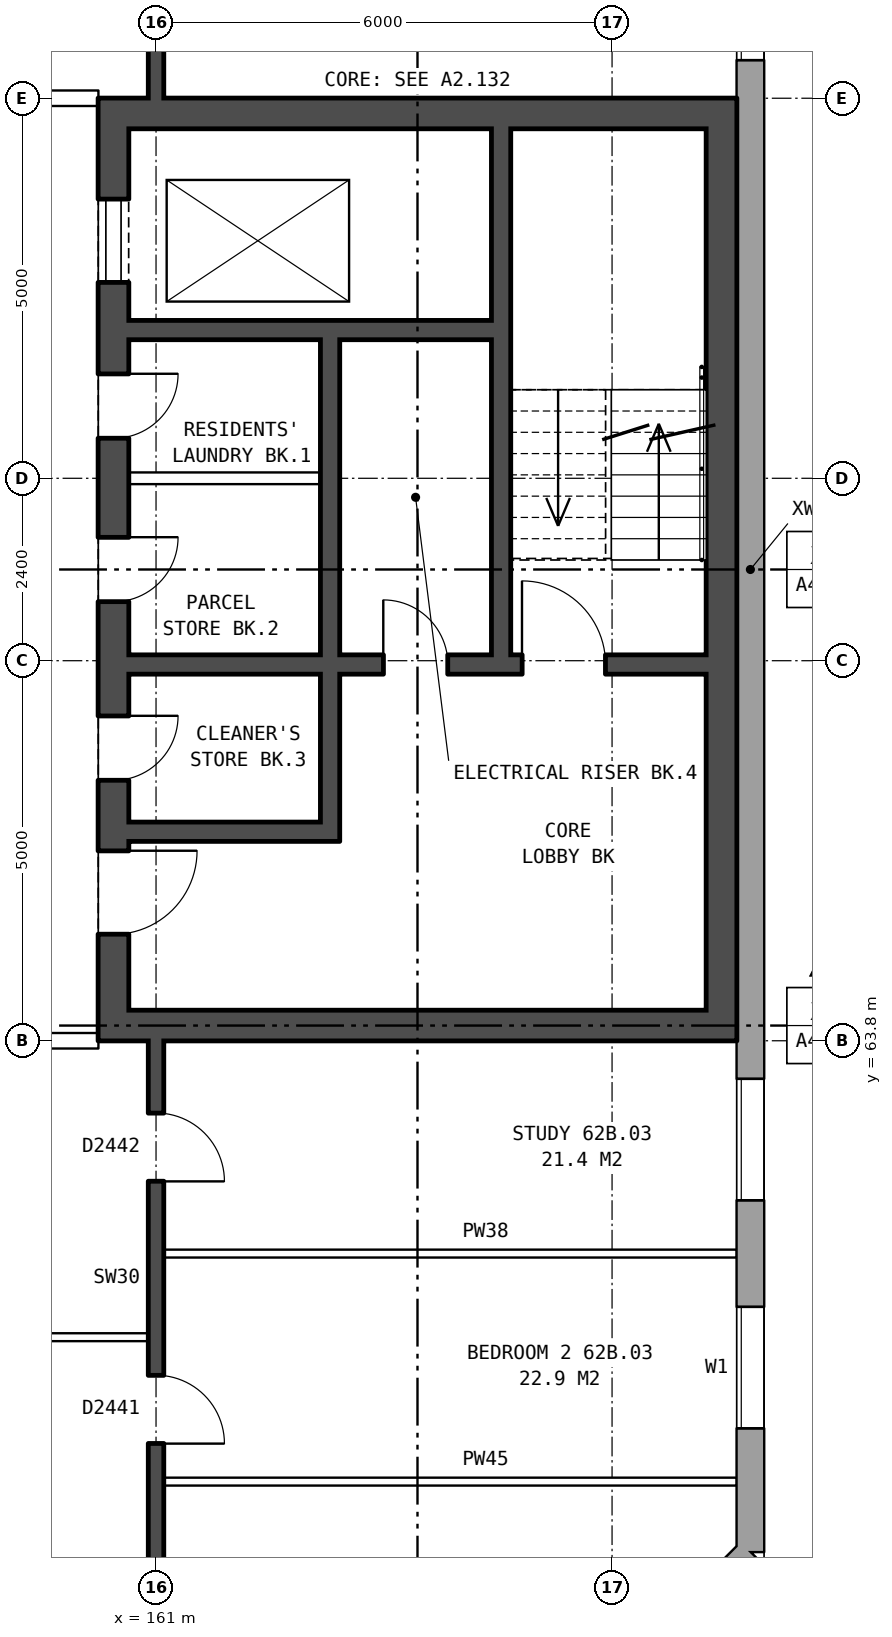
"""IFC4 building model, lengths in metres.
Left out: names, types, materials, properties, quantities, classifications, styles, units other than length and angle.
Written with IfcOpenShell. Run it as: python <this file> out.ifc"""

import sys

from ifc_helpers import new_model, si_unit, direction, frame, frame_2d, origin, place, context, subcontext, project, spatial, rectangle, extrude, element, fill, save


model = new_model("IFC4")
c1 = context("Model", 3, precision=1e-05, world=origin(), true_north=direction((0.0, 1.0)))
c2 = subcontext(c1, "Body", "Model", "MODEL_VIEW")
j1 = project(units=[si_unit("LENGTHUNIT", "METRE"), si_unit("PLANEANGLEUNIT", "RADIAN")], contexts=[c1])
p1 = place(None, origin())
s1 = spatial("IfcSite", under=j1, at=p1, CompositionType="ELEMENT")
p2 = place(p1, origin())
s2 = spatial("IfcBuilding", under=s1, at=p2, CompositionType="ELEMENT")
p3 = place(p2, frame((0.0, 0.0, 221.4)))
s3 = spatial("IfcBuildingStorey", under=s2, at=p3, CompositionType="ELEMENT", Elevation=221.4)
p4 = place(p3, frame((165.925, 54.18, 0.0), z_axis=(0.0, 0.0, 1.0), x_axis=(0.707106781187, 0.707106781187, 0.0)))
e1 = element("IfcWall", 1, at=p4, inside=s3, PredefinedType="STANDARD", context=c2, shape_type="SweptSolid", body=[
    extrude(rectangle(XDim=4.094, YDim=0.36, at=frame_2d((2.047, 0.0))), origin(), (0.0, 0.0, 1.0), 2.85),
])
p5 = place(p4, frame((1.247, 0.0, 0.8)))
e2 = element("IfcOpeningElement", 2, at=p5, cuts=e1, PredefinedType="OPENING", context=c2, shape_type="SweptSolid", body=[
    extrude(rectangle(XDim=1.6, YDim=1.8, at=frame_2d((0.8, 0.9))), frame((0.0, 0.19, 0.0), z_axis=(0.0, -1.0, 0.0), x_axis=(1.0, 0.0, 0.0)), (0.0, 0.0, 1.0), 0.38),
])
p6 = place(p3, frame((168.82, 57.075, 0.0), z_axis=(0.0, 0.0, 1.0), x_axis=(0.0, 1.0, 0.0)))
e3 = element("IfcWall", 3, at=p6, inside=s3, PredefinedType="STANDARD", context=c2, shape_type="SweptSolid", body=[
    extrude(rectangle(XDim=25.851, YDim=0.36, at=frame_2d((12.925, 0.0))), origin(), (0.0, 0.0, 1.0), 2.85),
])
p7 = place(p6, frame((1.625, 0.0, 0.8)))
e4 = element("IfcOpeningElement", 4, at=p7, cuts=e3, PredefinedType="OPENING", context=c2, shape_type="SweptSolid", body=[
    extrude(rectangle(XDim=1.6, YDim=1.8, at=frame_2d((0.8, 0.9))), frame((0.0, 0.19, 0.0), z_axis=(0.0, -1.0, 0.0), x_axis=(1.0, 0.0, 0.0)), (0.0, 0.0, 1.0), 0.38),
])
p8 = place(p6, frame((4.625, 0.0, 0.8)))
e5 = element("IfcOpeningElement", 5, at=p8, cuts=e3, PredefinedType="OPENING", context=c2, shape_type="SweptSolid", body=[
    extrude(rectangle(XDim=1.6, YDim=1.8, at=frame_2d((0.8, 0.9))), frame((0.0, 0.19, 0.0), z_axis=(0.0, -1.0, 0.0), x_axis=(1.0, 0.0, 0.0)), (0.0, 0.0, 1.0), 0.38),
])
p9 = place(p6, frame((19.625, 0.0, 0.8)))
e6 = element("IfcOpeningElement", 6, at=p9, cuts=e3, PredefinedType="OPENING", context=c2, shape_type="SweptSolid", body=[
    extrude(rectangle(XDim=1.6, YDim=1.8, at=frame_2d((0.8, 0.9))), frame((0.0, 0.19, 0.0), z_axis=(0.0, -1.0, 0.0), x_axis=(1.0, 0.0, 0.0)), (0.0, 0.0, 1.0), 0.38),
])
p10 = place(p6, frame((22.625, 0.0, 0.8)))
e7 = element("IfcOpeningElement", 7, at=p10, cuts=e3, PredefinedType="OPENING", context=c2, shape_type="SweptSolid", body=[
    extrude(rectangle(XDim=1.6, YDim=1.8, at=frame_2d((0.8, 0.9))), frame((0.0, 0.19, 0.0), z_axis=(0.0, -1.0, 0.0), x_axis=(1.0, 0.0, 0.0)), (0.0, 0.0, 1.0), 0.38),
])
p11 = place(p3, frame((160.44, 76.2, 0.0), z_axis=(0.0, 0.0, 1.0), x_axis=(0.0, -1.0, 0.0)))
e8 = element("IfcWall", 8, at=p11, inside=s3, PredefinedType="SHEAR", context=c2, shape_type="SweptSolid", body=[
    extrude(rectangle(XDim=12.4, YDim=0.4, at=frame_2d((6.2, 0.0))), origin(), (0.0, 0.0, 1.0), 2.85),
])
p12 = place(p11, frame((1.325, 0.0, 0.0)))
e9 = element("IfcOpeningElement", 9, at=p12, cuts=e8, PredefinedType="OPENING", context=c2, shape_type="SweptSolid", body=[
    extrude(rectangle(XDim=1.1, YDim=2.1, at=frame_2d((0.55, 1.05))), frame((0.0, 0.21, 0.0), z_axis=(0.0, -1.0, 0.0), x_axis=(1.0, 0.0, 0.0)), (0.0, 0.0, 1.0), 0.42),
])
p13 = place(p11, frame((3.625, 0.0, 0.0)))
e10 = element("IfcOpeningElement", 10, at=p13, cuts=e8, PredefinedType="OPENING", context=c2, shape_type="SweptSolid", body=[
    extrude(rectangle(XDim=0.85, YDim=2.1, at=frame_2d((0.425, 1.05))), frame((0.0, 0.21, 0.0), z_axis=(0.0, -1.0, 0.0), x_axis=(1.0, 0.0, 0.0)), (0.0, 0.0, 1.0), 0.42),
])
p14 = place(p11, frame((5.775, 0.0, 0.0)))
e11 = element("IfcOpeningElement", 11, at=p14, cuts=e8, PredefinedType="OPENING", context=c2, shape_type="SweptSolid", body=[
    extrude(rectangle(XDim=0.85, YDim=2.1, at=frame_2d((0.425, 1.05))), frame((0.0, 0.21, 0.0), z_axis=(0.0, -1.0, 0.0), x_axis=(1.0, 0.0, 0.0)), (0.0, 0.0, 1.0), 0.42),
])
p15 = place(p11, frame((9.9, 0.0, 0.0)))
e12 = element("IfcOpeningElement", 12, at=p15, cuts=e8, PredefinedType="OPENING", context=c2, shape_type="SweptSolid", body=[
    extrude(rectangle(XDim=1.1, YDim=2.1, at=frame_2d((0.55, 1.05))), frame((0.0, 0.21, 0.0), z_axis=(0.0, -1.0, 0.0), x_axis=(1.0, 0.0, 0.0)), (0.0, 0.0, 1.0), 0.42),
])
p16 = place(p11, frame((8.125, 0.0, 0.0)))
e13 = element("IfcOpeningElement", 13, at=p16, cuts=e8, PredefinedType="OPENING", context=c2, shape_type="SweptSolid", body=[
    extrude(rectangle(XDim=0.85, YDim=2.1, at=frame_2d((0.425, 1.05))), frame((0.0, 0.21, 0.0), z_axis=(0.0, -1.0, 0.0), x_axis=(1.0, 0.0, 0.0)), (0.0, 0.0, 1.0), 0.42),
])
p17 = place(p3, frame((168.44, 76.2, 0.0), z_axis=(0.0, 0.0, 1.0), x_axis=(0.0, -1.0, 0.0)))
e14 = element("IfcWall", 14, at=p17, inside=s3, PredefinedType="SHEAR", context=c2, shape_type="SweptSolid", body=[
    extrude(rectangle(XDim=12.4, YDim=0.4, at=frame_2d((6.2, 0.0))), origin(), (0.0, 0.0, 1.0), 2.85),
])
for number, where, z_axis, x_axis in (
    (15, (160.64, 76.0, 0.0), (0.0, 0.0, 1.0), (1.0, 0.0, 0.0)),
    (16, (160.64, 64.0, 0.0), (0.0, 0.0, 1.0), (1.0, 0.0, 0.0)),
):
    element("IfcWall", number, at=place(p3, frame(where, z_axis=z_axis, x_axis=x_axis)), inside=s3, PredefinedType="SHEAR", context=c2, shape_type="SweptSolid", body=[
        extrude(rectangle(XDim=7.6, YDim=0.4, at=frame_2d((3.8, 0.0))), origin(), (0.0, 0.0, 1.0), 2.85),
    ])
p18 = place(p3, frame((160.64, 73.15, 0.0), z_axis=(0.0, 0.0, 1.0), x_axis=(1.0, 0.0, 0.0)))
e17 = element("IfcWall", 17, at=p18, inside=s3, PredefinedType="SHEAR", context=c2, shape_type="SweptSolid", body=[
    extrude(rectangle(XDim=4.775, YDim=0.25, at=frame_2d((2.388, 0.0))), origin(), (0.0, 0.0, 1.0), 2.85),
])
p19 = place(p3, frame((160.64, 71.2, 0.0), z_axis=(0.0, 0.0, 1.0), x_axis=(1.0, 0.0, 0.0)))
e18 = element("IfcWall", 18, at=p19, inside=s3, PredefinedType="PARTITIONING", context=c2, shape_type="SweptSolid", body=[
    extrude(rectangle(XDim=2.525, YDim=0.15, at=frame_2d((1.263, 0.0))), origin(), (0.0, 0.0, 1.0), 2.85),
])
p20 = place(p3, frame((160.64, 68.75, 0.0), z_axis=(0.0, 0.0, 1.0), x_axis=(1.0, 0.0, 0.0)))
e19 = element("IfcWall", 19, at=p20, inside=s3, PredefinedType="SHEAR", context=c2, shape_type="SweptSolid", body=[
    extrude(rectangle(XDim=7.6, YDim=0.25, at=frame_2d((3.8, 0.0))), origin(), (0.0, 0.0, 1.0), 2.85),
])
p21 = place(p20, frame((5.175, 0.0, 0.0)))
e20 = element("IfcOpeningElement", 20, at=p21, cuts=e19, PredefinedType="OPENING", context=c2, shape_type="SweptSolid", body=[
    extrude(rectangle(XDim=1.1, YDim=2.1, at=frame_2d((0.55, 1.05))), frame((0.0, 0.135, 0.0), z_axis=(0.0, -1.0, 0.0), x_axis=(1.0, 0.0, 0.0)), (0.0, 0.0, 1.0), 0.27),
])
p22 = place(p20, frame((3.35, 0.0, 0.0)))
e21 = element("IfcOpeningElement", 21, at=p22, cuts=e19, PredefinedType="OPENING", context=c2, shape_type="SweptSolid", body=[
    extrude(rectangle(XDim=0.85, YDim=2.1, at=frame_2d((0.425, 1.05))), frame((0.0, 0.135, 0.0), z_axis=(0.0, -1.0, 0.0), x_axis=(1.0, 0.0, 0.0)), (0.0, 0.0, 1.0), 0.27),
])
p23 = place(p3, frame((160.64, 66.55, 0.0), z_axis=(0.0, 0.0, 1.0), x_axis=(1.0, 0.0, 0.0)))
e22 = element("IfcWall", 22, at=p23, inside=s3, PredefinedType="SHEAR", context=c2, shape_type="SweptSolid", body=[
    extrude(rectangle(XDim=2.525, YDim=0.25, at=frame_2d((1.263, 0.0))), origin(), (0.0, 0.0, 1.0), 2.85),
])
p24 = place(p3, frame((163.29, 73.025, 0.0), z_axis=(0.0, 0.0, 1.0), x_axis=(0.0, -1.0, 0.0)))
e23 = element("IfcWall", 23, at=p24, inside=s3, PredefinedType="SHEAR", context=c2, shape_type="SweptSolid", body=[
    extrude(rectangle(XDim=4.15, YDim=0.25, at=frame_2d((2.075, 0.0))), origin(), (0.0, 0.0, 1.0), 2.85),
])
p25 = place(p3, frame((163.29, 68.625, 0.0), z_axis=(0.0, 0.0, 1.0), x_axis=(0.0, -1.0, 0.0)))
e24 = element("IfcWall", 24, at=p25, inside=s3, PredefinedType="SHEAR", context=c2, shape_type="SweptSolid", body=[
    extrude(rectangle(XDim=2.2, YDim=0.25, at=frame_2d((1.1, 0.0))), origin(), (0.0, 0.0, 1.0), 2.85),
])
p26 = place(p3, frame((165.54, 75.8, 0.0), z_axis=(0.0, 0.0, 1.0), x_axis=(0.0, -1.0, 0.0)))
e25 = element("IfcWall", 25, at=p26, inside=s3, PredefinedType="SHEAR", context=c2, shape_type="SweptSolid", body=[
    extrude(rectangle(XDim=6.925, YDim=0.25, at=frame_2d((3.462, 0.0))), origin(), (0.0, 0.0, 1.0), 2.85),
])
p27 = place(p3, frame((161.1, 58.0, 0.0), z_axis=(0.0, 0.0, 1.0), x_axis=(1.0, 0.0, 0.0)))
e26 = element("IfcWall", 26, at=p27, inside=s3, PredefinedType="PARTITIONING", context=c2, shape_type="SweptSolid", body=[
    extrude(rectangle(XDim=7.54, YDim=0.1, at=frame_2d((3.77, 0.0))), origin(), (0.0, 0.0, 1.0), 2.85),
])
p28 = place(p3, frame((155.1, 59.9, 0.0), z_axis=(0.0, 0.0, 1.0), x_axis=(1.0, 0.0, 0.0)))
e27 = element("IfcWall", 27, at=p28, inside=s3, PredefinedType="PARTITIONING", context=c2, shape_type="SweptSolid", body=[
    extrude(rectangle(XDim=5.8, YDim=0.1, at=frame_2d((2.9, 0.0))), origin(), (0.0, 0.0, 1.0), 2.85),
])
p29 = place(p28, frame((3.6, 0.0, 0.0)))
e28 = element("IfcOpeningElement", 28, at=p29, cuts=e27, PredefinedType="OPENING", context=c2, shape_type="SweptSolid", body=[
    extrude(rectangle(XDim=0.9, YDim=2.1, at=frame_2d((0.45, 1.05))), frame((0.0, 0.06, 0.0), z_axis=(0.0, -1.0, 0.0), x_axis=(1.0, 0.0, 0.0)), (0.0, 0.0, 1.0), 0.12),
])
p30 = place(p28, frame((0.7, 0.0, 0.0)))
e29 = element("IfcOpeningElement", 29, at=p30, cuts=e27, PredefinedType="OPENING", context=c2, shape_type="SweptSolid", body=[
    extrude(rectangle(XDim=0.9, YDim=2.1, at=frame_2d((0.45, 1.05))), frame((0.0, 0.06, 0.0), z_axis=(0.0, -1.0, 0.0), x_axis=(1.0, 0.0, 0.0)), (0.0, 0.0, 1.0), 0.12),
])
p31 = place(p3, frame((161.1, 61.0, 0.0), z_axis=(0.0, 0.0, 1.0), x_axis=(1.0, 0.0, 0.0)))
e30 = element("IfcWall", 30, at=p31, inside=s3, PredefinedType="PARTITIONING", context=c2, shape_type="SweptSolid", body=[
    extrude(rectangle(XDim=7.54, YDim=0.1, at=frame_2d((3.77, 0.0))), origin(), (0.0, 0.0, 1.0), 2.85),
])
p32 = place(p3, frame((157.24, 63.8, 0.0), z_axis=(0.0, 0.0, 1.0), x_axis=(1.0, 0.0, 0.0)))
e31 = element("IfcWall", 31, at=p32, inside=s3, PredefinedType="PARTITIONING", context=c2, shape_type="SweptSolid", body=[
    extrude(rectangle(XDim=3.0, YDim=0.2, at=frame_2d((1.5, 0.0))), origin(), (0.0, 0.0, 1.0), 2.85),
])
p33 = place(p32, frame((1.0, 0.0, 0.0)))
e32 = element("IfcOpeningElement", 32, at=p33, cuts=e31, PredefinedType="OPENING", context=c2, shape_type="SweptSolid", body=[
    extrude(rectangle(XDim=1.0, YDim=2.1, at=frame_2d((0.5, 1.05))), frame((0.0, 0.11, 0.0), z_axis=(0.0, -1.0, 0.0), x_axis=(1.0, 0.0, 0.0)), (0.0, 0.0, 1.0), 0.22),
])
p34 = place(p3, frame((157.24, 76.2, 0.0), z_axis=(0.0, 0.0, 1.0), x_axis=(1.0, 0.0, 0.0)))
e33 = element("IfcWall", 33, at=p34, inside=s3, PredefinedType="PARTITIONING", context=c2, shape_type="SweptSolid", body=[
    extrude(rectangle(XDim=3.0, YDim=0.2, at=frame_2d((1.5, 0.0))), origin(), (0.0, 0.0, 1.0), 2.85),
])
p35 = place(p34, frame((1.0, 0.0, 0.0)))
e34 = element("IfcOpeningElement", 34, at=p35, cuts=e33, PredefinedType="OPENING", context=c2, shape_type="SweptSolid", body=[
    extrude(rectangle(XDim=1.0, YDim=2.1, at=frame_2d((0.5, 1.05))), frame((0.0, 0.11, 0.0), z_axis=(0.0, -1.0, 0.0), x_axis=(1.0, 0.0, 0.0)), (0.0, 0.0, 1.0), 0.22),
])
p36 = place(p3, frame((161.0, 54.36, 0.0), z_axis=(0.0, 0.0, 1.0), x_axis=(0.0, 1.0, 0.0)))
e35 = element("IfcWall", 35, at=p36, inside=s3, PredefinedType="SOLIDWALL", context=c2, shape_type="SweptSolid", body=[
    extrude(rectangle(XDim=9.44, YDim=0.2, at=frame_2d((4.72, 0.0))), origin(), (0.0, 0.0, 1.0), 2.85),
])
p37 = place(p36, frame((1.37, 0.0, 0.0)))
e36 = element("IfcOpeningElement", 36, at=p37, cuts=e35, PredefinedType="OPENING", context=c2, shape_type="SweptSolid", body=[
    extrude(rectangle(XDim=0.9, YDim=2.1, at=frame_2d((0.45, 1.05))), frame((0.0, 0.11, 0.0), z_axis=(0.0, -1.0, 0.0), x_axis=(1.0, 0.0, 0.0)), (0.0, 0.0, 1.0), 0.22),
])
p38 = place(p36, frame((4.14, 0.0, 0.0)))
e37 = element("IfcOpeningElement", 37, at=p38, cuts=e35, PredefinedType="OPENING", context=c2, shape_type="SweptSolid", body=[
    extrude(rectangle(XDim=0.9, YDim=2.1, at=frame_2d((0.45, 1.05))), frame((0.0, 0.11, 0.0), z_axis=(0.0, -1.0, 0.0), x_axis=(1.0, 0.0, 0.0)), (0.0, 0.0, 1.0), 0.22),
])
p39 = place(p36, frame((7.59, 0.0, 0.0)))
e38 = element("IfcOpeningElement", 38, at=p39, cuts=e35, PredefinedType="OPENING", context=c2, shape_type="SweptSolid", body=[
    extrude(rectangle(XDim=0.9, YDim=2.1, at=frame_2d((0.45, 1.05))), frame((0.0, 0.11, 0.0), z_axis=(0.0, -1.0, 0.0), x_axis=(1.0, 0.0, 0.0)), (0.0, 0.0, 1.0), 0.22),
])
p40 = place(p3, frame((161.0, 76.2, 0.0), z_axis=(0.0, 0.0, 1.0), x_axis=(0.0, 1.0, 0.0)))
e39 = element("IfcWall", 39, at=p40, inside=s3, PredefinedType="SOLIDWALL", context=c2, shape_type="SweptSolid", body=[
    extrude(rectangle(XDim=9.44, YDim=0.2, at=frame_2d((4.72, 0.0))), origin(), (0.0, 0.0, 1.0), 2.85),
])
p41 = place(p40, frame((7.17, 0.0, 0.0)))
e40 = element("IfcOpeningElement", 40, at=p41, cuts=e39, PredefinedType="OPENING", context=c2, shape_type="SweptSolid", body=[
    extrude(rectangle(XDim=0.9, YDim=2.1, at=frame_2d((0.45, 1.05))), frame((0.0, 0.11, 0.0), z_axis=(0.0, -1.0, 0.0), x_axis=(1.0, 0.0, 0.0)), (0.0, 0.0, 1.0), 0.22),
])
p42 = place(p40, frame((4.1, 0.0, 0.0)))
e41 = element("IfcOpeningElement", 41, at=p42, cuts=e39, PredefinedType="OPENING", context=c2, shape_type="SweptSolid", body=[
    extrude(rectangle(XDim=0.9, YDim=2.1, at=frame_2d((0.45, 1.05))), frame((0.0, 0.11, 0.0), z_axis=(0.0, -1.0, 0.0), x_axis=(1.0, 0.0, 0.0)), (0.0, 0.0, 1.0), 0.22),
])
p43 = place(p40, frame((0.95, 0.0, 0.0)))
e42 = element("IfcOpeningElement", 42, at=p43, cuts=e39, PredefinedType="OPENING", context=c2, shape_type="SweptSolid", body=[
    extrude(rectangle(XDim=0.9, YDim=2.1, at=frame_2d((0.45, 1.05))), frame((0.0, 0.11, 0.0), z_axis=(0.0, -1.0, 0.0), x_axis=(1.0, 0.0, 0.0)), (0.0, 0.0, 1.0), 0.22),
])
p44 = place(p7, origin())
e43 = element("IfcWindow", 43, at=p44, inside=s3, PartitioningType="SINGLE_PANEL", PredefinedType="WINDOW", context=c2, shape_type="SweptSolid", body=[
    extrude(rectangle(XDim=1.6, YDim=1.8, at=frame_2d((0.8, 0.9))), frame((0.0, 0.15, 0.0), z_axis=(0.0, -1.0, 0.0), x_axis=(1.0, 0.0, 0.0)), (0.0, 0.0, 1.0), 0.06),
])
fill(e4, e43)
p45 = place(p8, origin())
e44 = element("IfcWindow", 44, at=p45, inside=s3, PartitioningType="SINGLE_PANEL", PredefinedType="WINDOW", context=c2, shape_type="SweptSolid", body=[
    extrude(rectangle(XDim=1.6, YDim=1.8, at=frame_2d((0.8, 0.9))), frame((0.0, 0.15, 0.0), z_axis=(0.0, -1.0, 0.0), x_axis=(1.0, 0.0, 0.0)), (0.0, 0.0, 1.0), 0.06),
])
fill(e5, e44)
p46 = place(p9, origin())
e45 = element("IfcWindow", 45, at=p46, inside=s3, PartitioningType="SINGLE_PANEL", PredefinedType="WINDOW", context=c2, shape_type="SweptSolid", body=[
    extrude(rectangle(XDim=1.6, YDim=1.8, at=frame_2d((0.8, 0.9))), frame((0.0, 0.15, 0.0), z_axis=(0.0, -1.0, 0.0), x_axis=(1.0, 0.0, 0.0)), (0.0, 0.0, 1.0), 0.06),
])
fill(e6, e45)
p47 = place(p12, origin())
e46 = element("IfcDoor", 46, at=p47, inside=s3, OperationType="DOUBLE_DOOR_SLIDING", PredefinedType="DOOR", context=c2, shape_type="SweptSolid", body=[
    extrude(rectangle(XDim=1.1, YDim=2.1, at=frame_2d((0.55, 1.05))), frame((0.0, 0.185, 0.0), z_axis=(0.0, -1.0, 0.0), x_axis=(1.0, 0.0, 0.0)), (0.0, 0.0, 1.0), 0.05),
])
fill(e9, e46)
p48 = place(p13, origin())
e47 = element("IfcDoor", 47, at=p48, inside=s3, OperationType="SINGLE_SWING_LEFT", PredefinedType="DOOR", context=c2, shape_type="SweptSolid", body=[
    extrude(rectangle(XDim=0.85, YDim=2.1, at=frame_2d((0.425, 1.05))), frame((0.0, 0.185, 0.0), z_axis=(0.0, -1.0, 0.0), x_axis=(1.0, 0.0, 0.0)), (0.0, 0.0, 1.0), 0.05),
])
fill(e10, e47)
p49 = place(p14, origin())
e48 = element("IfcDoor", 48, at=p49, inside=s3, OperationType="SINGLE_SWING_LEFT", PredefinedType="DOOR", context=c2, shape_type="SweptSolid", body=[
    extrude(rectangle(XDim=0.85, YDim=2.1, at=frame_2d((0.425, 1.05))), frame((0.0, 0.185, 0.0), z_axis=(0.0, -1.0, 0.0), x_axis=(1.0, 0.0, 0.0)), (0.0, 0.0, 1.0), 0.05),
])
fill(e11, e48)
p50 = place(p15, origin())
e49 = element("IfcDoor", 49, at=p50, inside=s3, OperationType="SINGLE_SWING_LEFT", PredefinedType="DOOR", context=c2, shape_type="SweptSolid", body=[
    extrude(rectangle(XDim=1.1, YDim=2.1, at=frame_2d((0.55, 1.05))), frame((0.0, 0.185, 0.0), z_axis=(0.0, -1.0, 0.0), x_axis=(1.0, 0.0, 0.0)), (0.0, 0.0, 1.0), 0.05),
])
fill(e12, e49)
p51 = place(p21, origin())
e50 = element("IfcDoor", 50, at=p51, inside=s3, OperationType="SINGLE_SWING_LEFT", PredefinedType="DOOR", context=c2, shape_type="SweptSolid", body=[
    extrude(rectangle(XDim=1.1, YDim=2.1, at=frame_2d((0.55, 1.05))), frame((0.0, 0.025, 0.0), z_axis=(0.0, -1.0, 0.0), x_axis=(1.0, 0.0, 0.0)), (0.0, 0.0, 1.0), 0.05),
])
fill(e20, e50)
p52 = place(p16, origin())
e51 = element("IfcDoor", 51, at=p52, inside=s3, OperationType="SINGLE_SWING_LEFT", PredefinedType="DOOR", context=c2, shape_type="SweptSolid", body=[
    extrude(rectangle(XDim=0.85, YDim=2.1, at=frame_2d((0.425, 1.05))), frame((0.0, 0.185, 0.0), z_axis=(0.0, -1.0, 0.0), x_axis=(1.0, 0.0, 0.0)), (0.0, 0.0, 1.0), 0.05),
])
fill(e13, e51)
p53 = place(p22, origin())
e52 = element("IfcDoor", 52, at=p53, inside=s3, OperationType="SINGLE_SWING_LEFT", PredefinedType="DOOR", context=c2, shape_type="SweptSolid", body=[
    extrude(rectangle(XDim=0.85, YDim=2.1, at=frame_2d((0.425, 1.05))), frame((0.0, 0.025, 0.0), z_axis=(0.0, -1.0, 0.0), x_axis=(1.0, 0.0, 0.0)), (0.0, 0.0, 1.0), 0.05),
])
fill(e21, e52)
p54 = place(p38, frame((0.9, 0.0, 0.0), z_axis=(0.0, 0.0, 1.0), x_axis=(-1.0, 0.0, 0.0)))
e53 = element("IfcDoor", 53, at=p54, inside=s3, OperationType="SINGLE_SWING_RIGHT", PredefinedType="DOOR", context=c2, shape_type="SweptSolid", body=[
    extrude(rectangle(XDim=0.9, YDim=2.1, at=frame_2d((0.45, 1.05))), frame((0.0, 0.025, 0.0), z_axis=(0.0, -1.0, 0.0), x_axis=(1.0, 0.0, 0.0)), (0.0, 0.0, 1.0), 0.05),
])
fill(e37, e53)
p55 = place(p39, frame((0.9, 0.0, 0.0), z_axis=(0.0, 0.0, 1.0), x_axis=(-1.0, 0.0, 0.0)))
e54 = element("IfcDoor", 54, at=p55, inside=s3, OperationType="SINGLE_SWING_RIGHT", PredefinedType="DOOR", context=c2, shape_type="SweptSolid", body=[
    extrude(rectangle(XDim=0.9, YDim=2.1, at=frame_2d((0.45, 1.05))), frame((0.0, 0.025, 0.0), z_axis=(0.0, -1.0, 0.0), x_axis=(1.0, 0.0, 0.0)), (0.0, 0.0, 1.0), 0.05),
])
fill(e38, e54)
save(model, sys.argv[1])
